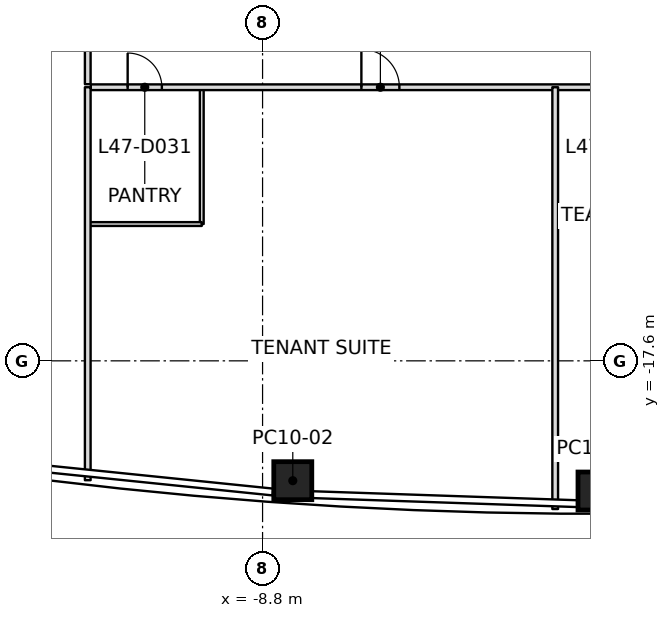
"""IFC4 building model, lengths in metres.
Left out: names, types, materials, properties, quantities, classifications, styles, units other than length and angle.
Written with IfcOpenShell. Run it as: python <this file> out.ifc"""

import sys

from ifc_helpers import new_model, si_unit, direction, frame, frame_2d, origin, origin_2d, place, context, subcontext, project, spatial, rectangle, extrude, clip, halfspace, element, fill, save


model = new_model("IFC4")
c1 = context("Model", 3, precision=1e-05, world=origin(), true_north=direction((0.0, 1.0)))
c2 = subcontext(c1, "Body", "Model", "MODEL_VIEW")
j1 = project(units=[si_unit("LENGTHUNIT", "METRE"), si_unit("PLANEANGLEUNIT", "RADIAN")], contexts=[c1])
p1 = place(None, origin())
s1 = spatial("IfcSite", under=j1, at=p1, CompositionType="ELEMENT")
p2 = place(p1, origin())
s2 = spatial("IfcBuilding", under=s1, at=p2, CompositionType="ELEMENT")
p3 = place(p2, frame((0.0, 0.0, 209.8)))
s3 = spatial("IfcBuildingStorey", under=s2, at=p3, CompositionType="ELEMENT", Elevation=209.8)
p4 = place(p3, frame((-8.005, -20.754, 0.0), z_axis=(0.008788174922, 0.01116830563, 0.999899013366), x_axis=(-0.997653816386, 0.06799057406, 0.008009025544)))
e1 = element("IfcColumn", 1, at=p4, inside=s3, PredefinedType="COLUMN", context=c2, shape_type="SweptSolid", body=[
    clip(extrude(rectangle(XDim=1.0, YDim=1.0, at=origin_2d()), origin(), (0.0, 0.0, 1.0), 4.0), halfspace(frame((0.0, 0.0, 3.999)), False)),
])
p5 = place(p3, frame((0.0, -21.026, 0.0), z_axis=(0.0, 0.01141283087, 0.999934871525), x_axis=(1.0, 0.0, 0.0)))
e2 = element("IfcColumn", 2, at=p5, inside=s3, PredefinedType="COLUMN", context=c2, shape_type="SweptSolid", body=[
    clip(extrude(rectangle(XDim=1.0, YDim=1.0, at=origin_2d()), origin(), (0.0, 0.0, 1.0), 4.0), halfspace(frame((0.0, 0.0, 3.999)), False)),
])
p6 = place(p3, frame((-13.4, -10.4, 0.0), z_axis=(0.0, 0.0, 1.0), x_axis=(0.0, -1.0, 0.0)))
e3 = element("IfcWall", 3, at=p6, inside=s3, PredefinedType="PARTITIONING", context=c2, shape_type="SweptSolid", body=[
    extrude(rectangle(XDim=10.341, YDim=0.15, at=frame_2d((5.17, 0.0))), origin(), (0.0, 0.0, 1.0), 3.134),
])
p7 = place(p3, frame((-1.1, -10.4, 0.0), z_axis=(0.0, 0.0, 1.0), x_axis=(0.0, -1.0, 0.0)))
e4 = element("IfcWall", 4, at=p7, inside=s3, PredefinedType="PARTITIONING", context=c2, shape_type="SweptSolid", body=[
    extrude(rectangle(XDim=11.1, YDim=0.15, at=frame_2d((5.55, 0.0))), origin(), (0.0, 0.0, 1.0), 3.134),
])
p8 = place(p3, frame((-13.4, 10.32, 0.0), z_axis=(0.0, 0.0, 1.0), x_axis=(0.0, -1.0, 0.0)))
e5 = element("IfcWall", 5, at=p8, inside=s3, PredefinedType="PARTITIONING", context=c2, shape_type="SweptSolid", body=[
    extrude(rectangle(XDim=20.64, YDim=0.15, at=frame_2d((10.32, 0.0))), origin(), (0.0, 0.0, 1.0), 3.066),
])
p9 = place(p8, frame((4.82, 0.0, 0.0)))
e6 = element("IfcOpeningElement", 6, at=p9, cuts=e5, PredefinedType="OPENING", context=c2, shape_type="SweptSolid", body=[
    extrude(rectangle(XDim=1.0, YDim=2.1, at=frame_2d((0.5, 1.05))), frame((0.0, 0.075, 0.0), z_axis=(0.0, -1.0, 0.0), x_axis=(1.0, 0.0, 0.0)), (0.0, 0.0, 1.0), 0.15),
])
p10 = place(p8, frame((11.77, 0.0, 0.0)))
e7 = element("IfcOpeningElement", 7, at=p10, cuts=e5, PredefinedType="OPENING", context=c2, shape_type="SweptSolid", body=[
    extrude(rectangle(XDim=0.9, YDim=2.1, at=frame_2d((0.45, 1.05))), frame((0.0, 0.075, 0.0), z_axis=(0.0, -1.0, 0.0), x_axis=(1.0, 0.0, 0.0)), (0.0, 0.0, 1.0), 0.15),
])
p11 = place(p8, frame((16.78, 0.0, 0.0)))
e8 = element("IfcOpeningElement", 8, at=p11, cuts=e5, PredefinedType="OPENING", context=c2, shape_type="SweptSolid", body=[
    extrude(rectangle(XDim=1.0, YDim=2.1, at=frame_2d((0.5, 1.05))), frame((0.0, 0.075, 0.0), z_axis=(0.0, -1.0, 0.0), x_axis=(1.0, 0.0, 0.0)), (0.0, 0.0, 1.0), 0.15),
])
p12 = place(p3, frame((-13.32, -10.4, 0.0), z_axis=(0.0, 0.0, 1.0), x_axis=(1.0, 0.0, 0.0)))
e9 = element("IfcWall", 9, at=p12, inside=s3, PredefinedType="PARTITIONING", context=c2, shape_type="SweptSolid", body=[
    extrude(rectangle(XDim=26.64, YDim=0.15, at=frame_2d((13.32, 0.0))), origin(), (0.0, 0.0, 1.0), 3.138),
])
p13 = place(p12, frame((0.97, 0.0, 0.0)))
e10 = element("IfcOpeningElement", 10, at=p13, cuts=e9, PredefinedType="OPENING", context=c2, shape_type="SweptSolid", body=[
    extrude(rectangle(XDim=0.9, YDim=2.1, at=frame_2d((0.45, 1.05))), frame((0.0, 0.075, 0.0), z_axis=(0.0, -1.0, 0.0), x_axis=(1.0, 0.0, 0.0)), (0.0, 0.0, 1.0), 0.15),
])
p14 = place(p12, frame((7.12, 0.0, 0.0)))
e11 = element("IfcOpeningElement", 11, at=p14, cuts=e9, PredefinedType="OPENING", context=c2, shape_type="SweptSolid", body=[
    extrude(rectangle(XDim=1.0, YDim=2.1, at=frame_2d((0.5, 1.05))), frame((0.0, 0.075, 0.0), z_axis=(0.0, -1.0, 0.0), x_axis=(1.0, 0.0, 0.0)), (0.0, 0.0, 1.0), 0.15),
])
p15 = place(p12, frame((13.27, 0.0, 0.0)))
e12 = element("IfcOpeningElement", 12, at=p15, cuts=e9, PredefinedType="OPENING", context=c2, shape_type="SweptSolid", body=[
    extrude(rectangle(XDim=0.9, YDim=2.1, at=frame_2d((0.45, 1.05))), frame((0.0, 0.075, 0.0), z_axis=(0.0, -1.0, 0.0), x_axis=(1.0, 0.0, 0.0)), (0.0, 0.0, 1.0), 0.15),
])
p16 = place(p12, frame((20.52, 0.0, 0.0)))
e13 = element("IfcOpeningElement", 13, at=p16, cuts=e9, PredefinedType="OPENING", context=c2, shape_type="SweptSolid", body=[
    extrude(rectangle(XDim=1.0, YDim=2.1, at=frame_2d((0.5, 1.05))), frame((0.0, 0.075, 0.0), z_axis=(0.0, -1.0, 0.0), x_axis=(1.0, 0.0, 0.0)), (0.0, 0.0, 1.0), 0.15),
])
p17 = place(p3, frame((-10.4, -10.43, 0.0), z_axis=(0.0, 0.0, 1.0), x_axis=(0.0, -1.0, 0.0)))
e14 = element("IfcWall", 14, at=p17, inside=s3, PredefinedType="PARTITIONING", context=c2, shape_type="SweptSolid", body=[
    extrude(rectangle(XDim=3.57, YDim=0.1, at=frame_2d((1.785, 0.0))), origin(), (0.0, 0.0, 1.0), 3.35),
])
p18 = place(p3, frame((-10.4, -14.0, 0.0), z_axis=(0.0, 0.0, 1.0), x_axis=(-1.0, 0.0, 0.0)))
e15 = element("IfcWall", 15, at=p18, inside=s3, PredefinedType="PARTITIONING", context=c2, shape_type="SweptSolid", body=[
    extrude(rectangle(XDim=2.97, YDim=0.1, at=frame_2d((1.485, 0.0))), origin(), (0.0, 0.0, 1.0), 3.206),
])
p19 = place(p3, frame((1.9, -14.0, 0.0), z_axis=(0.0, 0.0, 1.0), x_axis=(-1.0, 0.0, 0.0)))
e16 = element("IfcWall", 16, at=p19, inside=s3, PredefinedType="PARTITIONING", context=c2, shape_type="SweptSolid", body=[
    extrude(rectangle(XDim=2.97, YDim=0.1, at=frame_2d((1.485, 0.0))), origin(), (0.0, 0.0, 1.0), 3.138),
])
p20 = place(p13, origin())
e17 = element("IfcDoor", 17, at=p20, inside=s3, OperationType="SINGLE_SWING_RIGHT", PredefinedType="DOOR", context=c2, shape_type="SweptSolid", body=[
    extrude(rectangle(XDim=0.9, YDim=2.1, at=frame_2d((0.45, 1.05))), frame((0.0, 0.025, 0.0), z_axis=(0.0, -1.0, 0.0), x_axis=(1.0, 0.0, 0.0)), (0.0, 0.0, 1.0), 0.05),
])
fill(e10, e17)
p21 = place(p14, origin())
e18 = element("IfcDoor", 18, at=p21, inside=s3, OperationType="SINGLE_SWING_RIGHT", PredefinedType="DOOR", context=c2, shape_type="SweptSolid", body=[
    extrude(rectangle(XDim=1.0, YDim=2.1, at=frame_2d((0.5, 1.05))), frame((0.0, 0.025, 0.0), z_axis=(0.0, -1.0, 0.0), x_axis=(1.0, 0.0, 0.0)), (0.0, 0.0, 1.0), 0.05),
])
fill(e11, e18)
save(model, sys.argv[1])
